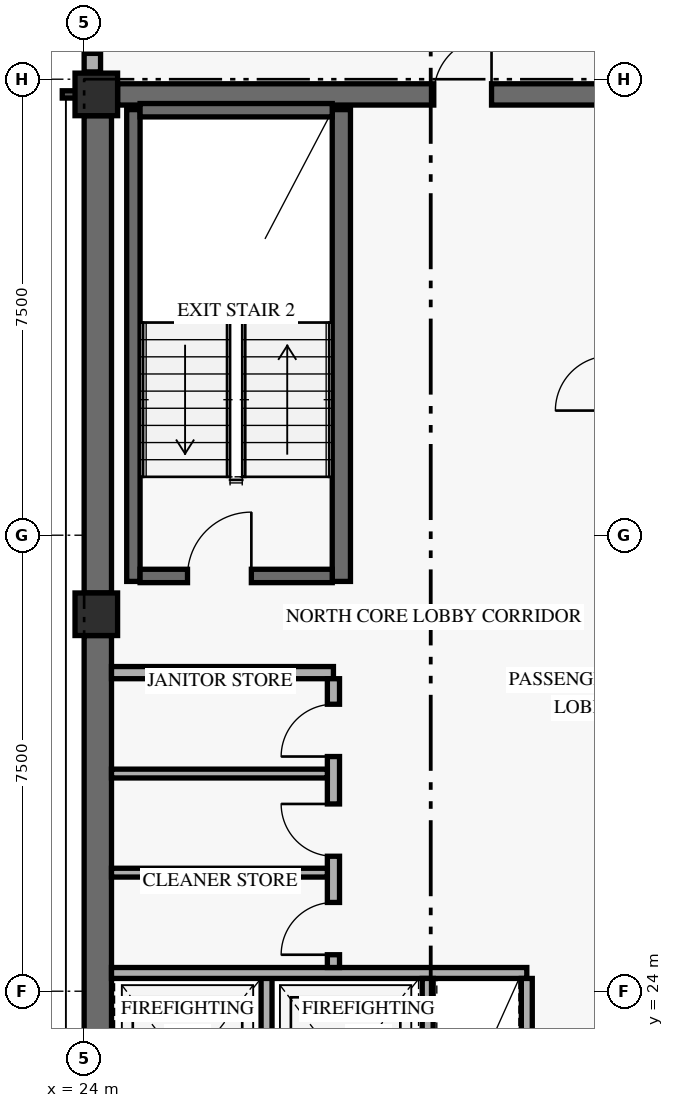
"""IFC4 building model, lengths in metres.
Left out: names, types, materials, properties, quantities, classifications, styles, units other than length and angle.
Written with IfcOpenShell. Run it as: python <this file> out.ifc"""

import sys

from ifc_helpers import new_model, si_unit, direction, frame, frame_2d, origin, origin_2d, place, context, subcontext, project, spatial, rectangle, extrude, element, fill, save


model = new_model("IFC4")
c1 = context("Model", 3, precision=1e-05, world=origin(), true_north=direction((0.0, 1.0)))
c2 = subcontext(c1, "Body", "Model", "MODEL_VIEW")
j1 = project(units=[si_unit("LENGTHUNIT", "METRE"), si_unit("PLANEANGLEUNIT", "RADIAN")], contexts=[c1])
p1 = place(None, origin())
s1 = spatial("IfcSite", under=j1, at=p1, CompositionType="ELEMENT")
p2 = place(p1, origin())
s2 = spatial("IfcBuilding", under=s1, at=p2, CompositionType="ELEMENT")
p3 = place(p2, frame((0.0, 0.0, 213.0)))
s3 = spatial("IfcBuildingStorey", under=s2, at=p3, CompositionType="ELEMENT", Elevation=213.0)
p4 = place(p3, frame((24.225, 17.9, 0.0), z_axis=(0.0, 0.0, 1.0), x_axis=(0.0, 1.0, 0.0)))
e1 = element("IfcWall", 1, at=p4, inside=s3, PredefinedType="SHEAR", context=c2, shape_type="SweptSolid", body=[
    extrude(rectangle(XDim=11.95, YDim=0.45, at=frame_2d((5.975, 0.0))), origin(), (0.0, 0.0, 1.0), 2.821),
])
p5 = place(p3, frame((24.225, 30.55, 0.0), z_axis=(0.0, 0.0, 1.0), x_axis=(0.0, 1.0, 0.0)))
e2 = element("IfcWall", 2, at=p5, inside=s3, PredefinedType="SHEAR", context=c2, shape_type="SweptSolid", body=[
    extrude(rectangle(XDim=7.85, YDim=0.45, at=frame_2d((3.925, 0.0))), origin(), (0.0, 0.0, 1.0), 2.821),
])
p6 = place(p3, frame((24.55, 38.75, 0.0), z_axis=(0.0, 0.0, 1.0), x_axis=(1.0, 0.0, 0.0)))
e3 = element("IfcWall", 3, at=p6, inside=s3, PredefinedType="SHEAR", context=c2, shape_type="SweptSolid", body=[
    extrude(rectangle(XDim=10.3, YDim=0.35, at=frame_2d((5.15, 0.0))), origin(), (0.0, 0.0, 1.0), 3.36),
])
p7 = place(p6, frame((5.2, 0.0, 0.0)))
e4 = element("IfcOpeningElement", 4, at=p7, cuts=e3, PredefinedType="OPENING", context=c2, shape_type="SweptSolid", body=[
    extrude(rectangle(XDim=0.95, YDim=2.15, at=frame_2d((0.475, 1.075))), frame((0.0, 0.185, 0.0), z_axis=(0.0, -1.0, 0.0), x_axis=(1.0, 0.0, 0.0)), (0.0, 0.0, 1.0), 0.37),
])
p8 = place(p3, frame((24.81, 30.74, 0.0), z_axis=(0.0, 0.0, 1.0), x_axis=(0.0, 1.0, 0.0)))
e5 = element("IfcWall", 5, at=p8, inside=s3, PredefinedType="SHEAR", context=c2, shape_type="SweptSolid", body=[
    extrude(rectangle(XDim=7.76, YDim=0.22, at=frame_2d((3.88, 0.0))), origin(), (0.0, 0.0, 1.0), 3.36),
])
p9 = place(p3, frame((28.23, 30.74, 0.0), z_axis=(0.0, 0.0, 1.0), x_axis=(0.0, 1.0, 0.0)))
e6 = element("IfcWall", 6, at=p9, inside=s3, PredefinedType="SHEAR", context=c2, shape_type="SweptSolid", body=[
    extrude(rectangle(XDim=7.76, YDim=0.3, at=frame_2d((3.88, 0.0))), origin(), (0.0, 0.0, 1.0), 3.36),
])
p10 = place(p3, frame((24.92, 30.83, 0.0), z_axis=(0.0, 0.0, 1.0), x_axis=(1.0, 0.0, 0.0)))
e7 = element("IfcWall", 7, at=p10, inside=s3, PredefinedType="SHEAR", context=c2, shape_type="SweptSolid", body=[
    extrude(rectangle(XDim=3.16, YDim=0.22, at=frame_2d((1.58, 0.0))), origin(), (0.0, 0.0, 1.0), 3.36),
])
p11 = place(p10, frame((0.78, 0.0, 0.0)))
e8 = element("IfcOpeningElement", 8, at=p11, cuts=e7, PredefinedType="OPENING", context=c2, shape_type="SweptSolid", body=[
    extrude(rectangle(XDim=1.05, YDim=2.15, at=frame_2d((0.525, 1.075))), frame((0.0, 0.12, 0.0), z_axis=(0.0, -1.0, 0.0), x_axis=(1.0, 0.0, 0.0)), (0.0, 0.0, 1.0), 0.24),
])
p12 = place(p3, frame((24.92, 38.49, 0.0), z_axis=(0.0, 0.0, 1.0), x_axis=(1.0, 0.0, 0.0)))
e9 = element("IfcWall", 9, at=p12, inside=s3, PredefinedType="SHEAR", context=c2, shape_type="SweptSolid", body=[
    extrude(rectangle(XDim=3.16, YDim=0.22, at=frame_2d((1.58, 0.0))), origin(), (0.0, 0.0, 1.0), 3.36),
])
for number, where, z_axis, x_axis in (
    (10, (24.2, 30.2, 0.0), (0.0, 0.0, 1.0), (1.0, 0.0, 0.0)),
    (11, (24.2, 38.75, 0.0), (0.0, 0.0, 1.0), (1.0, 0.0, 0.0)),
):
    element("IfcColumn", number, at=place(p3, frame(where, z_axis=z_axis, x_axis=x_axis)), inside=s3, PredefinedType="COLUMN", context=c2, shape_type="SweptSolid", body=[
        extrude(rectangle(XDim=0.7, YDim=0.7, at=origin_2d()), origin(), (0.0, 0.0, 1.0), 3.6),
    ])
p13 = place(p3, frame((24.135, 39.12, 0.0), z_axis=(0.0, 0.0, 1.0), x_axis=(0.0, 1.0, 0.0)))
e12 = element("IfcWall", 12, at=p13, inside=s3, PredefinedType="SOLIDWALL", context=c2, shape_type="SweptSolid", body=[
    extrude(rectangle(XDim=1.56, YDim=0.27, at=frame_2d((0.78, 0.0))), origin(), (0.0, 0.0, 1.0), 2.803),
])
p14 = place(p13, frame((0.305, 0.0, 0.85)))
e13 = element("IfcOpeningElement", 13, at=p14, cuts=e12, PredefinedType="OPENING", context=c2, shape_type="SweptSolid", body=[
    extrude(rectangle(XDim=0.95, YDim=1.5, at=frame_2d((0.475, 0.75))), frame((0.0, 0.145, 0.0), z_axis=(0.0, -1.0, 0.0), x_axis=(1.0, 0.0, 0.0)), (0.0, 0.0, 1.0), 0.29),
])
p15 = place(p3, frame((27.0, 21.19, 0.0), z_axis=(0.0, 0.0, 1.0), x_axis=(0.0, 1.0, 0.0)))
e14 = element("IfcWall", 14, at=p15, inside=s3, PredefinedType="STANDARD", context=c2, shape_type="SweptSolid", body=[
    extrude(rectangle(XDim=3.11, YDim=0.18, at=frame_2d((1.555, 0.0))), origin(), (0.0, 0.0, 1.0), 3.36),
])
p16 = place(p3, frame((24.45, 24.3, 0.0), z_axis=(0.0, 0.0, 1.0), x_axis=(1.0, 0.0, 0.0)))
e15 = element("IfcWall", 15, at=p16, inside=s3, PredefinedType="STANDARD", context=c2, shape_type="SweptSolid", body=[
    extrude(rectangle(XDim=6.83, YDim=0.18, at=frame_2d((3.415, 0.0))), origin(), (0.0, 0.0, 1.0), 3.36),
])
for number, where, z_axis, x_axis in (
    (16, (29.65, 21.19, 0.0), (0.0, 0.0, 1.0), (0.0, 1.0, 0.0)),
    (17, (31.28, 21.19, 0.0), (0.0, 0.0, 1.0), (0.0, 1.0, 0.0)),
):
    element("IfcWall", number, at=place(p3, frame(where, z_axis=z_axis, x_axis=x_axis)), inside=s3, PredefinedType="STANDARD", context=c2, shape_type="SweptSolid", body=[
        extrude(rectangle(XDim=3.02, YDim=0.18, at=frame_2d((1.51, 0.0))), origin(), (0.0, 0.0, 1.0), 3.36),
    ])
p17 = place(p3, frame((24.45, 29.24, 0.0), z_axis=(0.0, 0.0, 1.0), x_axis=(1.0, 0.0, 0.0)))
e18 = element("IfcWall", 18, at=p17, inside=s3, PredefinedType="STANDARD", context=c2, shape_type="SweptSolid", body=[
    extrude(rectangle(XDim=3.65, YDim=0.2, at=frame_2d((1.825, 0.0))), origin(), (0.0, 0.0, 1.0), 3.36),
])
p18 = place(p3, frame((28.1, 24.39, 0.0), z_axis=(0.0, 0.0, 1.0), x_axis=(0.0, 1.0, 0.0)))
e19 = element("IfcWall", 19, at=p18, inside=s3, PredefinedType="STANDARD", context=c2, shape_type="SweptSolid", body=[
    extrude(rectangle(XDim=4.75, YDim=0.2, at=frame_2d((2.375, 0.0))), origin(), (0.0, 0.0, 1.0), 3.36),
])
p19 = place(p18, frame((0.21, 0.0, 0.0)))
e20 = element("IfcOpeningElement", 20, at=p19, cuts=e19, PredefinedType="OPENING", context=c2, shape_type="SweptSolid", body=[
    extrude(rectangle(XDim=0.86, YDim=2.1, at=frame_2d((0.43, 1.05))), frame((0.0, 0.11, 0.0), z_axis=(0.0, -1.0, 0.0), x_axis=(1.0, 0.0, 0.0)), (0.0, 0.0, 1.0), 0.22),
])
p20 = place(p18, frame((1.83, 0.0, 0.0)))
e21 = element("IfcOpeningElement", 21, at=p20, cuts=e19, PredefinedType="OPENING", context=c2, shape_type="SweptSolid", body=[
    extrude(rectangle(XDim=0.86, YDim=2.1, at=frame_2d((0.43, 1.05))), frame((0.0, 0.11, 0.0), z_axis=(0.0, -1.0, 0.0), x_axis=(1.0, 0.0, 0.0)), (0.0, 0.0, 1.0), 0.22),
])
p21 = place(p18, frame((3.47, 0.0, 0.0)))
e22 = element("IfcOpeningElement", 22, at=p21, cuts=e19, PredefinedType="OPENING", context=c2, shape_type="SweptSolid", body=[
    extrude(rectangle(XDim=0.86, YDim=2.1, at=frame_2d((0.43, 1.05))), frame((0.0, 0.11, 0.0), z_axis=(0.0, -1.0, 0.0), x_axis=(1.0, 0.0, 0.0)), (0.0, 0.0, 1.0), 0.22),
])
for number, where, z_axis, x_axis in (
    (23, (24.45, 25.95, 0.0), (0.0, 0.0, 1.0), (1.0, 0.0, 0.0)),
    (24, (24.45, 27.58, 0.0), (0.0, 0.0, 1.0), (1.0, 0.0, 0.0)),
):
    element("IfcWall", number, at=place(p3, frame(where, z_axis=z_axis, x_axis=x_axis)), inside=s3, PredefinedType="PARTITIONING", context=c2, shape_type="SweptSolid", body=[
        extrude(rectangle(XDim=3.55, YDim=0.145, at=frame_2d((1.775, 0.0))), origin(), (0.0, 0.0, 1.0), 3.36),
    ])
p22 = place(p14, origin())
e25 = element("IfcWindow", 25, at=p22, inside=s3, PartitioningType="SINGLE_PANEL", PredefinedType="WINDOW", context=c2, shape_type="SweptSolid", body=[
    extrude(rectangle(XDim=0.95, YDim=1.5, at=frame_2d((0.475, 0.75))), frame((0.0, 0.03, 0.0), z_axis=(0.0, -1.0, 0.0), x_axis=(1.0, 0.0, 0.0)), (0.0, 0.0, 1.0), 0.06),
])
fill(e13, e25)
p23 = place(p11, origin())
e26 = element("IfcDoor", 26, at=p23, inside=s3, OperationType="SINGLE_SWING_RIGHT", PredefinedType="DOOR", context=c2, shape_type="SweptSolid", body=[
    extrude(rectangle(XDim=1.05, YDim=2.15, at=frame_2d((0.525, 1.075))), frame((0.0, 0.025, 0.0), z_axis=(0.0, -1.0, 0.0), x_axis=(1.0, 0.0, 0.0)), (0.0, 0.0, 1.0), 0.05),
])
fill(e8, e26)
p24 = place(p19, origin())
e27 = element("IfcDoor", 27, at=p24, inside=s3, OperationType="SINGLE_SWING_LEFT", PredefinedType="DOOR", context=c2, shape_type="SweptSolid", body=[
    extrude(rectangle(XDim=0.86, YDim=2.1, at=frame_2d((0.43, 1.05))), frame((0.0, 0.025, 0.0), z_axis=(0.0, -1.0, 0.0), x_axis=(1.0, 0.0, 0.0)), (0.0, 0.0, 1.0), 0.05),
])
fill(e20, e27)
p25 = place(p20, origin())
e28 = element("IfcDoor", 28, at=p25, inside=s3, OperationType="SINGLE_SWING_RIGHT", PredefinedType="DOOR", context=c2, shape_type="SweptSolid", body=[
    extrude(rectangle(XDim=0.86, YDim=2.1, at=frame_2d((0.43, 1.05))), frame((0.0, 0.025, 0.0), z_axis=(0.0, -1.0, 0.0), x_axis=(1.0, 0.0, 0.0)), (0.0, 0.0, 1.0), 0.05),
])
fill(e21, e28)
p26 = place(p21, origin())
e29 = element("IfcDoor", 29, at=p26, inside=s3, OperationType="SINGLE_SWING_LEFT", PredefinedType="DOOR", context=c2, shape_type="SweptSolid", body=[
    extrude(rectangle(XDim=0.86, YDim=2.1, at=frame_2d((0.43, 1.05))), frame((0.0, 0.025, 0.0), z_axis=(0.0, -1.0, 0.0), x_axis=(1.0, 0.0, 0.0)), (0.0, 0.0, 1.0), 0.05),
])
fill(e22, e29)
p27 = place(p7, origin())
e30 = element("IfcDoor", 30, at=p27, inside=s3, OperationType="SINGLE_SWING_RIGHT", PredefinedType="DOOR", context=c2, shape_type="SweptSolid", body=[
    extrude(rectangle(XDim=0.95, YDim=2.15, at=frame_2d((0.475, 1.075))), frame((0.0, 0.025, 0.0), z_axis=(0.0, -1.0, 0.0), x_axis=(1.0, 0.0, 0.0)), (0.0, 0.0, 1.0), 0.05),
])
fill(e4, e30)
save(model, sys.argv[1])
